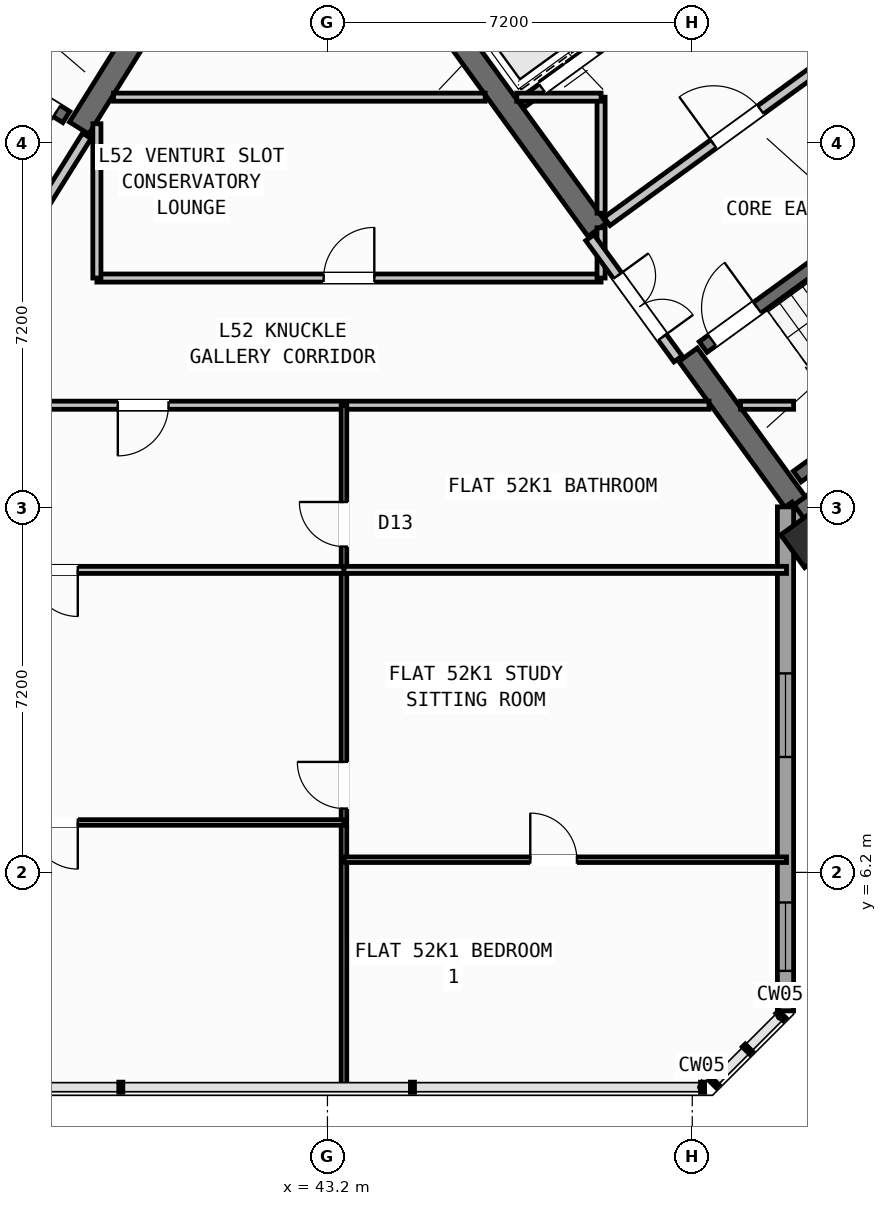
"""IFC4 building model, lengths in metres.
Left out: names, types, materials, properties, quantities, classifications, styles, units other than length and angle.
Written with IfcOpenShell. Run it as: python <this file> out.ifc"""

import sys

from ifc_helpers import new_model, si_unit, direction, frame, frame_2d, origin, origin_2d, place, context, subcontext, project, spatial, rectangle, hollow_rectangle, extrude, source, transform, mapped, element, fill, save


model = new_model("IFC4")
c1 = context("Model", 3, precision=1e-05, world=origin(), true_north=direction((0.0, 1.0)))
c2 = subcontext(c1, "Body", "Model", "MODEL_VIEW")
j1 = project(units=[si_unit("LENGTHUNIT", "METRE"), si_unit("PLANEANGLEUNIT", "RADIAN")], contexts=[c1])
p1 = place(None, origin())
s1 = spatial("IfcSite", under=j1, at=p1, CompositionType="ELEMENT")
p2 = place(p1, origin())
s2 = spatial("IfcBuilding", under=s1, at=p2, CompositionType="ELEMENT")
p3 = place(p2, frame((0.0, 0.0, 207.6)))
s3 = spatial("IfcBuildingStorey", under=s2, at=p3, CompositionType="ELEMENT", Elevation=207.6)
p4 = place(p3, frame((40.221, 23.965, 0.0), z_axis=(0.0, 0.0, 1.0), x_axis=(-0.529902075036, -0.848058836916, 0.0)))
e1 = element("IfcWall", 1, at=p4, inside=s3, PredefinedType="SHEAR", context=c2, shape_type="SweptSolid", body=[
    extrude(rectangle(XDim=3.625, YDim=0.45, at=frame_2d((1.812, 0.0))), origin(), (0.0, 0.0, 1.0), 3.35),
])
p5 = place(p3, frame((52.399, 13.169, 0.0), z_axis=(0.0, 0.0, 1.0), x_axis=(0.809022352778, 0.587777877013, 0.0)))
e2 = element("IfcWall", 2, at=p5, inside=s3, PredefinedType="SHEAR", context=c2, shape_type="SweptSolid", body=[
    extrude(rectangle(XDim=12.24, YDim=0.45, at=frame_2d((6.12, 0.0))), origin(), (0.0, 0.0, 1.0), 3.35),
])
p6 = place(p3, frame((52.449, 13.483, 0.0), z_axis=(0.0, 0.0, 1.0), x_axis=(-0.587819244441, 0.808992296542, 0.0)))
e3 = element("IfcWall", 3, at=p6, inside=s3, PredefinedType="SHEAR", context=c2, shape_type="SweptSolid", body=[
    extrude(rectangle(XDim=3.625, YDim=0.45, at=frame_2d((1.812, 0.0))), origin(), (0.0, 0.0, 1.0), 3.35),
])
p7 = place(p3, frame((48.526, 18.884, 0.0), z_axis=(0.0, 0.0, 1.0), x_axis=(-0.587774812919, 0.809024578921, 0.0)))
e4 = element("IfcWall", 4, at=p7, inside=s3, PredefinedType="SHEAR", context=c2, shape_type="SweptSolid", body=[
    extrude(rectangle(XDim=6.475, YDim=0.45, at=frame_2d((3.238, 0.0))), origin(), (0.0, 0.0, 1.0), 3.35),
])
m1 = source(origin(), c2, "Body", "SweptSolid", [
    extrude(hollow_rectangle(XDim=0.8, YDim=0.8, WallThickness=0.032, at=origin_2d()), origin(), (0.0, 0.0, 1.0), 3.6),
])
p8 = place(p3, frame((52.705, 12.773, 0.0), z_axis=(0.0, 0.0, 1.0), x_axis=(0.809016994375, 0.587785252292, 0.0)))
e5 = element("IfcColumn", 5, at=p8, inside=s3, PredefinedType="COLUMN", context=c2, shape_type="MappedRepresentation", body=[
    mapped(m1, transform((0.0, 0.0, 0.0), scale=1.0)),
])
p9 = place(p3, frame((52.937, 12.455, 0.0), z_axis=(0.0, 0.0, 1.0), x_axis=(-0.587706324018, 0.809074333241, 0.0)))
e6 = element("IfcWall", 6, at=p9, inside=s3, PredefinedType="STANDARD", context=c2, shape_type="SweptSolid", body=[
    extrude(rectangle(XDim=1.186, YDim=0.32, at=frame_2d((0.593, 0.0))), origin(), (0.0, 0.0, 1.0), 3.35),
])
p10 = place(p3, frame((52.24, 13.414, 0.0), z_axis=(0.0, 0.0, 1.0), x_axis=(0.0, -1.0, 0.0)))
e7 = element("IfcWall", 7, at=p10, inside=s3, PredefinedType="STANDARD", context=c2, shape_type="SweptSolid", body=[
    extrude(rectangle(XDim=9.948, YDim=0.32, at=frame_2d((4.974, 0.0))), origin(), (0.0, 0.0, 1.0), 3.35),
])
p11 = place(p10, frame((3.287, 0.0, 0.9)))
e8 = element("IfcOpeningElement", 8, at=p11, cuts=e7, PredefinedType="OPENING", context=c2, shape_type="SweptSolid", body=[
    extrude(rectangle(XDim=1.65, YDim=1.45, at=frame_2d((0.825, 0.725))), frame((0.0, 0.17, 0.0), z_axis=(0.0, -1.0, 0.0), x_axis=(1.0, 0.0, 0.0)), (0.0, 0.0, 1.0), 0.34),
])
p12 = place(p10, frame((7.808, 0.0, 0.9)))
e9 = element("IfcOpeningElement", 9, at=p12, cuts=e7, PredefinedType="OPENING", context=c2, shape_type="SweptSolid", body=[
    extrude(rectangle(XDim=1.35, YDim=1.45, at=frame_2d((0.675, 0.725))), frame((0.0, 0.17, 0.0), z_axis=(0.0, -1.0, 0.0), x_axis=(1.0, 0.0, 0.0)), (0.0, 0.0, 1.0), 0.34),
])
p13 = place(p3, frame((38.046, 21.108, 0.0), z_axis=(0.0, 0.0, 1.0), x_axis=(-0.848054434086, 0.529909121291, 0.0)))
e10 = element("IfcWall", 10, at=p13, inside=s3, PredefinedType="SHEAR", context=c2, shape_type="SweptSolid", body=[
    extrude(rectangle(XDim=7.33, YDim=0.26, at=frame_2d((3.665, 0.0))), origin(), (0.0, 0.0, 1.0), 3.35),
])
p14 = place(p13, frame((0.22, 0.0, 0.0)))
e11 = element("IfcOpeningElement", 11, at=p14, cuts=e10, PredefinedType="OPENING", context=c2, shape_type="SweptSolid", body=[
    extrude(rectangle(XDim=1.1, YDim=2.1, at=frame_2d((0.55, 1.05))), frame((0.0, 0.14, 0.0), z_axis=(0.0, -1.0, 0.0), x_axis=(1.0, 0.0, 0.0)), (0.0, 0.0, 1.0), 0.28),
])
p15 = place(p3, frame((52.472, 14.013, 0.0), z_axis=(0.0, 0.0, 1.0), x_axis=(0.809028366311, 0.587769599847, 0.0)))
e12 = element("IfcWall", 12, at=p15, inside=s3, PredefinedType="SHEAR", context=c2, shape_type="SweptSolid", body=[
    extrude(rectangle(XDim=7.33, YDim=0.26, at=frame_2d((3.665, 0.0))), origin(), (0.0, 0.0, 1.0), 3.35),
])
p16 = place(p3, frame((50.615, 16.57, 0.0), z_axis=(0.0, 0.0, 1.0), x_axis=(0.809028366311, 0.587769599847, 0.0)))
e13 = element("IfcWall", 13, at=p16, inside=s3, PredefinedType="SHEAR", context=c2, shape_type="SweptSolid", body=[
    extrude(rectangle(XDim=7.33, YDim=0.26, at=frame_2d((3.665, 0.0))), origin(), (0.0, 0.0, 1.0), 3.35),
])
p17 = place(p16, frame((0.22, 0.0, 0.0)))
e14 = element("IfcOpeningElement", 14, at=p17, cuts=e13, PredefinedType="OPENING", context=c2, shape_type="SweptSolid", body=[
    extrude(rectangle(XDim=1.1, YDim=2.1, at=frame_2d((0.55, 1.05))), frame((0.0, 0.14, 0.0), z_axis=(0.0, -1.0, 0.0), x_axis=(1.0, 0.0, 0.0)), (0.0, 0.0, 1.0), 0.28),
])
p18 = place(p3, frame((47.025, 21.378, 0.0), z_axis=(0.0, 0.0, 1.0), x_axis=(0.809052869724, 0.587735870941, 0.0)))
e15 = element("IfcWall", 15, at=p18, inside=s3, PredefinedType="STANDARD", context=c2, shape_type="SweptSolid", body=[
    extrude(rectangle(XDim=3.498, YDim=0.2, at=frame_2d((1.749, 0.0))), origin(), (0.0, 0.0, 1.0), 3.34),
])
p19 = place(p18, frame((0.508, 0.0, 0.0)))
e16 = element("IfcOpeningElement", 16, at=p19, cuts=e15, PredefinedType="OPENING", context=c2, shape_type="SweptSolid", body=[
    extrude(rectangle(XDim=1.3, YDim=2.2, at=frame_2d((0.65, 1.1))), frame((0.0, 0.11, 0.0), z_axis=(0.0, -1.0, 0.0), x_axis=(1.0, 0.0, 0.0)), (0.0, 0.0, 1.0), 0.22),
])
p20 = place(p3, frame((48.718, 19.048, 0.0), z_axis=(0.0, 0.0, 1.0), x_axis=(0.809017261719, 0.587784884325, 0.0)))
e17 = element("IfcWall", 17, at=p20, inside=s3, PredefinedType="STANDARD", context=c2, shape_type="SweptSolid", body=[
    extrude(rectangle(XDim=5.818, YDim=0.2, at=frame_2d((2.909, 0.0))), origin(), (0.0, 0.0, 1.0), 3.34),
])
p21 = place(p20, frame((2.598, 0.0, 0.0)))
e18 = element("IfcOpeningElement", 18, at=p21, cuts=e17, PredefinedType="OPENING", context=c2, shape_type="SweptSolid", body=[
    extrude(rectangle(XDim=1.15, YDim=2.1, at=frame_2d((0.575, 1.05))), frame((0.0, 0.11, 0.0), z_axis=(0.0, -1.0, 0.0), x_axis=(1.0, 0.0, 0.0)), (0.0, 0.0, 1.0), 0.22),
])
p22 = place(p3, frame((38.451, 20.737, 0.0), z_axis=(0.0, 0.0, 1.0), x_axis=(-0.529924799939, -0.848044637038, 0.0)))
e19 = element("IfcWall", 19, at=p22, inside=s3, PredefinedType="STANDARD", context=c2, shape_type="SweptSolid", body=[
    extrude(rectangle(XDim=2.96, YDim=0.2, at=frame_2d((1.48, 0.0))), origin(), (0.0, 0.0, 1.0), 3.34),
])
p23 = place(p22, frame((1.46, 0.0, 0.0)))
e20 = element("IfcOpeningElement", 20, at=p23, cuts=e19, PredefinedType="OPENING", context=c2, shape_type="SweptSolid", body=[
    extrude(rectangle(XDim=0.86, YDim=2.05, at=frame_2d((0.43, 1.025))), frame((0.0, 0.11, 0.0), z_axis=(0.0, -1.0, 0.0), x_axis=(1.0, 0.0, 0.0)), (0.0, 0.0, 1.0), 0.22),
])
p24 = place(p3, frame((35.178, 15.42, 0.0), z_axis=(0.0, 0.0, 1.0), x_axis=(1.0, 0.0, 0.0)))
e21 = element("IfcWall", 21, at=p24, inside=s3, PredefinedType="PARTITIONING", context=c2, shape_type="SweptSolid", body=[
    extrude(rectangle(XDim=15.552, YDim=0.16, at=frame_2d((7.776, 0.0))), origin(), (0.0, 0.0, 1.0), 3.34),
])
p25 = place(p24, frame((3.885, 0.0, 0.0)))
e22 = element("IfcOpeningElement", 22, at=p25, cuts=e21, PredefinedType="OPENING", context=c2, shape_type="SweptSolid", body=[
    extrude(rectangle(XDim=1.0, YDim=2.1, at=frame_2d((0.5, 1.05))), frame((0.0, 0.09, 0.0), z_axis=(0.0, -1.0, 0.0), x_axis=(1.0, 0.0, 0.0)), (0.0, 0.0, 1.0), 0.18),
])
p26 = place(p3, frame((51.354, 15.42, 0.0), z_axis=(0.0, 0.0, 1.0), x_axis=(1.0, 0.0, 0.0)))
e23 = element("IfcWall", 23, at=p26, inside=s3, PredefinedType="PARTITIONING", context=c2, shape_type="SweptSolid", body=[
    extrude(rectangle(XDim=1.046, YDim=0.16, at=frame_2d((0.523, 0.0))), origin(), (0.0, 0.0, 1.0), 3.34),
])
p27 = place(p3, frame((38.65, 17.93, 0.0), z_axis=(0.0, 0.0, 1.0), x_axis=(1.0, 0.0, 0.0)))
e24 = element("IfcWall", 24, at=p27, inside=s3, PredefinedType="PARTITIONING", context=c2, shape_type="SweptSolid", body=[
    extrude(rectangle(XDim=9.95, YDim=0.16, at=frame_2d((4.975, 0.0))), origin(), (0.0, 0.0, 1.0), 3.34),
])
p28 = place(p27, frame((4.475, 0.0, 0.0)))
e25 = element("IfcOpeningElement", 25, at=p28, cuts=e24, PredefinedType="OPENING", context=c2, shape_type="SweptSolid", body=[
    extrude(rectangle(XDim=1.0, YDim=2.1, at=frame_2d((0.5, 1.05))), frame((0.0, 0.09, 0.0), z_axis=(0.0, -1.0, 0.0), x_axis=(1.0, 0.0, 0.0)), (0.0, 0.0, 1.0), 0.18),
])
p29 = place(p3, frame((38.65, 17.93, 0.0), z_axis=(0.0, 0.0, 1.0), x_axis=(0.0, 1.0, 0.0)))
e26 = element("IfcWall", 26, at=p29, inside=s3, PredefinedType="PARTITIONING", context=c2, shape_type="SweptSolid", body=[
    extrude(rectangle(XDim=3.046, YDim=0.16, at=frame_2d((1.523, 0.0))), origin(), (0.0, 0.0, 1.0), 3.34),
])
p30 = place(p3, frame((48.6, 17.93, 0.0), z_axis=(0.0, 0.0, 1.0), x_axis=(0.0, 1.0, 0.0)))
e27 = element("IfcWall", 27, at=p30, inside=s3, PredefinedType="PARTITIONING", context=c2, shape_type="SweptSolid", body=[
    extrude(rectangle(XDim=0.993, YDim=0.16, at=frame_2d((0.496, 0.0))), origin(), (0.0, 0.0, 1.0), 3.34),
])
p31 = place(p3, frame((48.6, 19.21, 0.0), z_axis=(0.0, 0.0, 1.0), x_axis=(0.0, 1.0, 0.0)))
e28 = element("IfcWall", 28, at=p31, inside=s3, PredefinedType="PARTITIONING", context=c2, shape_type="SweptSolid", body=[
    extrude(rectangle(XDim=2.29, YDim=0.16, at=frame_2d((1.145, 0.0))), origin(), (0.0, 0.0, 1.0), 3.34),
])
p32 = place(p3, frame((38.978, 21.5, 0.0), z_axis=(0.0, 0.0, 1.0), x_axis=(1.0, 0.0, 0.0)))
e29 = element("IfcWall", 29, at=p32, inside=s3, PredefinedType="PARTITIONING", context=c2, shape_type="SweptSolid", body=[
    extrude(rectangle(XDim=7.336, YDim=0.16, at=frame_2d((3.668, 0.0))), origin(), (0.0, 0.0, 1.0), 3.34),
])
p33 = place(p3, frame((46.936, 21.5, 0.0), z_axis=(0.0, 0.0, 1.0), x_axis=(1.0, 0.0, 0.0)))
e30 = element("IfcWall", 30, at=p33, inside=s3, PredefinedType="PARTITIONING", context=c2, shape_type="SweptSolid", body=[
    extrude(rectangle(XDim=1.664, YDim=0.16, at=frame_2d((0.832, 0.0))), origin(), (0.0, 0.0, 1.0), 3.34),
])
p34 = place(p3, frame((50.119, 16.333, 0.0), z_axis=(0.0, 0.0, 1.0), x_axis=(-0.587749856981, 0.809042709391, 0.0)))
e31 = element("IfcWall", 31, at=p34, inside=s3, PredefinedType="STANDARD", context=c2, shape_type="SweptSolid", body=[
    extrude(rectangle(XDim=2.96, YDim=0.2, at=frame_2d((1.48, 0.0))), origin(), (0.0, 0.0, 1.0), 3.34),
])
p35 = place(p34, frame((0.53, 0.0, 0.0)))
e32 = element("IfcOpeningElement", 32, at=p35, cuts=e31, PredefinedType="OPENING", context=c2, shape_type="SweptSolid", body=[
    extrude(rectangle(XDim=1.5, YDim=2.15, at=frame_2d((0.75, 1.075))), frame((0.0, 0.11, 0.0), z_axis=(0.0, -1.0, 0.0), x_axis=(1.0, 0.0, 0.0)), (0.0, 0.0, 1.0), 0.22),
])
p36 = place(p3, frame((43.526, 1.96, 0.0), z_axis=(0.0, 0.0, 1.0), x_axis=(0.0, 1.0, 0.0)))
e33 = element("IfcWall", 33, at=p36, inside=s3, PredefinedType="PARTITIONING", context=c2, shape_type="SweptSolid", body=[
    extrude(rectangle(XDim=13.46, YDim=0.11, at=frame_2d((6.73, 0.0))), origin(), (0.0, 0.0, 1.0), 3.34),
])
p37 = place(p36, frame((5.5, 0.0, 0.0)))
e34 = element("IfcOpeningElement", 34, at=p37, cuts=e33, PredefinedType="OPENING", context=c2, shape_type="SweptSolid", body=[
    extrude(rectangle(XDim=0.92, YDim=2.08, at=frame_2d((0.46, 1.04))), frame((0.0, 0.065, 0.0), z_axis=(0.0, -1.0, 0.0), x_axis=(1.0, 0.0, 0.0)), (0.0, 0.0, 1.0), 0.13),
])
p38 = place(p36, frame((10.67, 0.0, 0.0)))
e35 = element("IfcOpeningElement", 35, at=p38, cuts=e33, PredefinedType="OPENING", context=c2, shape_type="SweptSolid", body=[
    extrude(rectangle(XDim=0.88, YDim=2.08, at=frame_2d((0.44, 1.04))), frame((0.0, 0.065, 0.0), z_axis=(0.0, -1.0, 0.0), x_axis=(1.0, 0.0, 0.0)), (0.0, 0.0, 1.0), 0.13),
])
p39 = place(p3, frame((33.584, 12.17, 0.0), z_axis=(0.0, 0.0, 1.0), x_axis=(1.0, 0.0, 0.0)))
e36 = element("IfcWall", 36, at=p39, inside=s3, PredefinedType="PLUMBINGWALL", context=c2, shape_type="SweptSolid", body=[
    extrude(rectangle(XDim=9.942, YDim=0.14, at=frame_2d((4.971, 0.0))), origin(), (0.0, 0.0, 1.0), 2.525),
])
p40 = place(p39, frame((3.769, 0.0, 0.0)))
e37 = element("IfcOpeningElement", 37, at=p40, cuts=e36, PredefinedType="OPENING", context=c2, shape_type="SweptSolid", body=[
    extrude(rectangle(XDim=0.92, YDim=2.08, at=frame_2d((0.46, 1.04))), frame((0.0, 0.08, 0.0), z_axis=(0.0, -1.0, 0.0), x_axis=(1.0, 0.0, 0.0)), (0.0, 0.0, 1.0), 0.16),
])
p41 = place(p3, frame((43.526, 12.17, 0.0), z_axis=(0.0, 0.0, 1.0), x_axis=(1.0, 0.0, 0.0)))
e38 = element("IfcWall", 38, at=p41, inside=s3, PredefinedType="PLUMBINGWALL", context=c2, shape_type="SweptSolid", body=[
    extrude(rectangle(XDim=8.734, YDim=0.14, at=frame_2d((4.367, 0.0))), origin(), (0.0, 0.0, 1.0), 2.525),
])
p42 = place(p3, frame((31.74, 7.185, 0.0), z_axis=(0.0, 0.0, 1.0), x_axis=(1.0, 0.0, 0.0)))
e39 = element("IfcWall", 39, at=p42, inside=s3, PredefinedType="PARTITIONING", context=c2, shape_type="SweptSolid", body=[
    extrude(rectangle(XDim=11.786, YDim=0.11, at=frame_2d((5.893, 0.0))), origin(), (0.0, 0.0, 1.0), 3.34),
])
p43 = place(p42, frame((5.613, 0.0, 0.0)))
e40 = element("IfcOpeningElement", 40, at=p43, cuts=e39, PredefinedType="OPENING", context=c2, shape_type="SweptSolid", body=[
    extrude(rectangle(XDim=0.92, YDim=2.08, at=frame_2d((0.46, 1.04))), frame((0.0, 0.065, 0.0), z_axis=(0.0, -1.0, 0.0), x_axis=(1.0, 0.0, 0.0)), (0.0, 0.0, 1.0), 0.13),
])
p44 = place(p3, frame((43.526, 6.45, 0.0), z_axis=(0.0, 0.0, 1.0), x_axis=(1.0, 0.0, 0.0)))
e41 = element("IfcWall", 41, at=p44, inside=s3, PredefinedType="PARTITIONING", context=c2, shape_type="SweptSolid", body=[
    extrude(rectangle(XDim=8.734, YDim=0.11, at=frame_2d((4.367, 0.0))), origin(), (0.0, 0.0, 1.0), 3.34),
])
p45 = place(p44, frame((3.677, 0.0, 0.0)))
e42 = element("IfcOpeningElement", 42, at=p45, cuts=e41, PredefinedType="OPENING", context=c2, shape_type="SweptSolid", body=[
    extrude(rectangle(XDim=0.92, YDim=2.08, at=frame_2d((0.46, 1.04))), frame((0.0, 0.065, 0.0), z_axis=(0.0, -1.0, 0.0), x_axis=(1.0, 0.0, 0.0)), (0.0, 0.0, 1.0), 0.13),
])
m2 = source(origin(), c2, "Body", "SweptSolid", [
    extrude(rectangle(XDim=1.65, YDim=1.45, at=frame_2d((0.825, 0.725))), frame((0.0, 0.03, 0.0), z_axis=(0.0, -1.0, 0.0), x_axis=(1.0, 0.0, 0.0)), (0.0, 0.0, 1.0), 0.06),
])
p46 = place(p11, origin())
e43 = element("IfcWindow", 43, at=p46, inside=s3, PartitioningType="SINGLE_PANEL", PredefinedType="WINDOW", context=c2, shape_type="MappedRepresentation", body=[
    mapped(m2, transform((0.0, 0.0, 0.0), scale=1.0)),
])
fill(e8, e43)
m3 = source(origin(), c2, "Body", "SweptSolid", [
    extrude(rectangle(XDim=1.35, YDim=1.45, at=frame_2d((0.675, 0.725))), frame((0.0, 0.03, 0.0), z_axis=(0.0, -1.0, 0.0), x_axis=(1.0, 0.0, 0.0)), (0.0, 0.0, 1.0), 0.06),
])
p47 = place(p12, origin())
e44 = element("IfcWindow", 44, at=p47, inside=s3, PartitioningType="SINGLE_PANEL", PredefinedType="WINDOW", context=c2, shape_type="MappedRepresentation", body=[
    mapped(m3, transform((0.0, 0.0, 0.0), scale=1.0)),
])
fill(e9, e44)
m4 = source(origin(), c2, "Body", "SweptSolid", [
    extrude(rectangle(XDim=1.1, YDim=2.1, at=frame_2d((0.55, 1.05))), frame((0.0, 0.025, 0.0), z_axis=(0.0, -1.0, 0.0), x_axis=(1.0, 0.0, 0.0)), (0.0, 0.0, 1.0), 0.05),
])
p48 = place(p14, origin())
e45 = element("IfcDoor", 45, at=p48, inside=s3, OperationType="SINGLE_SWING_LEFT", PredefinedType="DOOR", context=c2, shape_type="MappedRepresentation", body=[
    mapped(m4, transform((0.0, 0.0, 0.0), scale=1.0)),
])
fill(e11, e45)
p49 = place(p17, origin())
e46 = element("IfcDoor", 46, at=p49, inside=s3, OperationType="SINGLE_SWING_RIGHT", PredefinedType="DOOR", context=c2, shape_type="MappedRepresentation", body=[
    mapped(m4, transform((0.0, 0.0, 0.0), scale=1.0)),
])
fill(e14, e46)
m5 = source(origin(), c2, "Body", "SweptSolid", [
    extrude(rectangle(XDim=1.15, YDim=2.1, at=frame_2d((0.575, 1.05))), frame((0.0, 0.025, 0.0), z_axis=(0.0, -1.0, 0.0), x_axis=(1.0, 0.0, 0.0)), (0.0, 0.0, 1.0), 0.05),
])
p50 = place(p21, origin())
e47 = element("IfcDoor", 47, at=p50, inside=s3, OperationType="SINGLE_SWING_LEFT", PredefinedType="DOOR", context=c2, shape_type="MappedRepresentation", body=[
    mapped(m5, transform((0.0, 0.0, 0.0), scale=1.0)),
])
fill(e18, e47)
m6 = source(origin(), c2, "Body", "SweptSolid", [
    extrude(rectangle(XDim=1.3, YDim=2.2, at=frame_2d((0.65, 1.1))), frame((0.0, 0.025, 0.0), z_axis=(0.0, -1.0, 0.0), x_axis=(1.0, 0.0, 0.0)), (0.0, 0.0, 1.0), 0.05),
])
p51 = place(p19, origin())
e48 = element("IfcDoor", 48, at=p51, inside=s3, OperationType="DOUBLE_DOOR_SLIDING", PredefinedType="DOOR", context=c2, shape_type="MappedRepresentation", body=[
    mapped(m6, transform((0.0, 0.0, 0.0), scale=1.0)),
])
fill(e16, e48)
m7 = source(origin(), c2, "Body", "SweptSolid", [
    extrude(rectangle(XDim=1.0, YDim=2.1, at=frame_2d((0.5, 1.05))), frame((0.0, 0.025, 0.0), z_axis=(0.0, -1.0, 0.0), x_axis=(1.0, 0.0, 0.0)), (0.0, 0.0, 1.0), 0.05),
])
p52 = place(p28, origin())
e49 = element("IfcDoor", 49, at=p52, inside=s3, OperationType="SINGLE_SWING_RIGHT", PredefinedType="DOOR", context=c2, shape_type="MappedRepresentation", body=[
    mapped(m7, transform((0.0, 0.0, 0.0), scale=1.0)),
])
fill(e25, e49)
m8 = source(origin(), c2, "Body", "SweptSolid", [
    extrude(rectangle(XDim=1.5, YDim=2.15, at=frame_2d((0.75, 1.075))), frame((0.0, 0.025, 0.0), z_axis=(0.0, -1.0, 0.0), x_axis=(1.0, 0.0, 0.0)), (0.0, 0.0, 1.0), 0.05),
])
p53 = place(p35, frame((1.5, 0.0, 0.0), z_axis=(0.0, 0.0, 1.0), x_axis=(-1.0, 0.0, 0.0)))
e50 = element("IfcDoor", 50, at=p53, inside=s3, OperationType="DOUBLE_DOOR_SINGLE_SWING", PredefinedType="DOOR", context=c2, shape_type="MappedRepresentation", body=[
    mapped(m8, transform((0.0, 0.0, 0.0), scale=1.0)),
])
fill(e32, e50)
m9 = source(origin(), c2, "Body", "SweptSolid", [
    extrude(rectangle(XDim=0.92, YDim=2.08, at=frame_2d((0.46, 1.04))), frame((0.0, 0.025, 0.0), z_axis=(0.0, -1.0, 0.0), x_axis=(1.0, 0.0, 0.0)), (0.0, 0.0, 1.0), 0.05),
])
p54 = place(p43, frame((0.92, 0.0, 0.0), z_axis=(0.0, 0.0, 1.0), x_axis=(-1.0, 0.0, 0.0)))
e51 = element("IfcDoor", 51, at=p54, inside=s3, OperationType="SINGLE_SWING_LEFT", PredefinedType="DOOR", context=c2, shape_type="MappedRepresentation", body=[
    mapped(m9, transform((0.0, 0.0, 0.0), scale=1.0)),
])
fill(e40, e51)
p55 = place(p37, origin())
e52 = element("IfcDoor", 52, at=p55, inside=s3, OperationType="SINGLE_SWING_RIGHT", PredefinedType="DOOR", context=c2, shape_type="MappedRepresentation", body=[
    mapped(m9, transform((0.0, 0.0, 0.0), scale=1.0)),
])
fill(e34, e52)
p56 = place(p45, origin())
e53 = element("IfcDoor", 53, at=p56, inside=s3, OperationType="SINGLE_SWING_LEFT", PredefinedType="DOOR", context=c2, shape_type="MappedRepresentation", body=[
    mapped(m9, transform((0.0, 0.0, 0.0), scale=1.0)),
])
fill(e42, e53)
p57 = place(p25, frame((1.0, 0.0, 0.0), z_axis=(0.0, 0.0, 1.0), x_axis=(-1.0, 0.0, 0.0)))
e54 = element("IfcDoor", 54, at=p57, inside=s3, OperationType="SINGLE_SWING_RIGHT", PredefinedType="DOOR", context=c2, shape_type="MappedRepresentation", body=[
    mapped(m7, transform((0.0, 0.0, 0.0), scale=1.0)),
])
fill(e22, e54)
p58 = place(p40, frame((0.92, 0.0, 0.0), z_axis=(0.0, 0.0, 1.0), x_axis=(-1.0, 0.0, 0.0)))
e55 = element("IfcDoor", 55, at=p58, inside=s3, OperationType="SINGLE_SWING_LEFT", PredefinedType="DOOR", context=c2, shape_type="MappedRepresentation", body=[
    mapped(m9, transform((0.0, 0.0, 0.0), scale=1.0)),
])
fill(e37, e55)
m10 = source(origin(), c2, "Body", "SweptSolid", [
    extrude(rectangle(XDim=0.88, YDim=2.08, at=frame_2d((0.44, 1.04))), frame((0.0, 0.025, 0.0), z_axis=(0.0, -1.0, 0.0), x_axis=(1.0, 0.0, 0.0)), (0.0, 0.0, 1.0), 0.05),
])
p59 = place(p38, origin())
e56 = element("IfcDoor", 56, at=p59, inside=s3, OperationType="SINGLE_SWING_RIGHT", PredefinedType="DOOR", context=c2, shape_type="MappedRepresentation", body=[
    mapped(m10, transform((0.0, 0.0, 0.0), scale=1.0)),
])
fill(e35, e56)
save(model, sys.argv[1])
